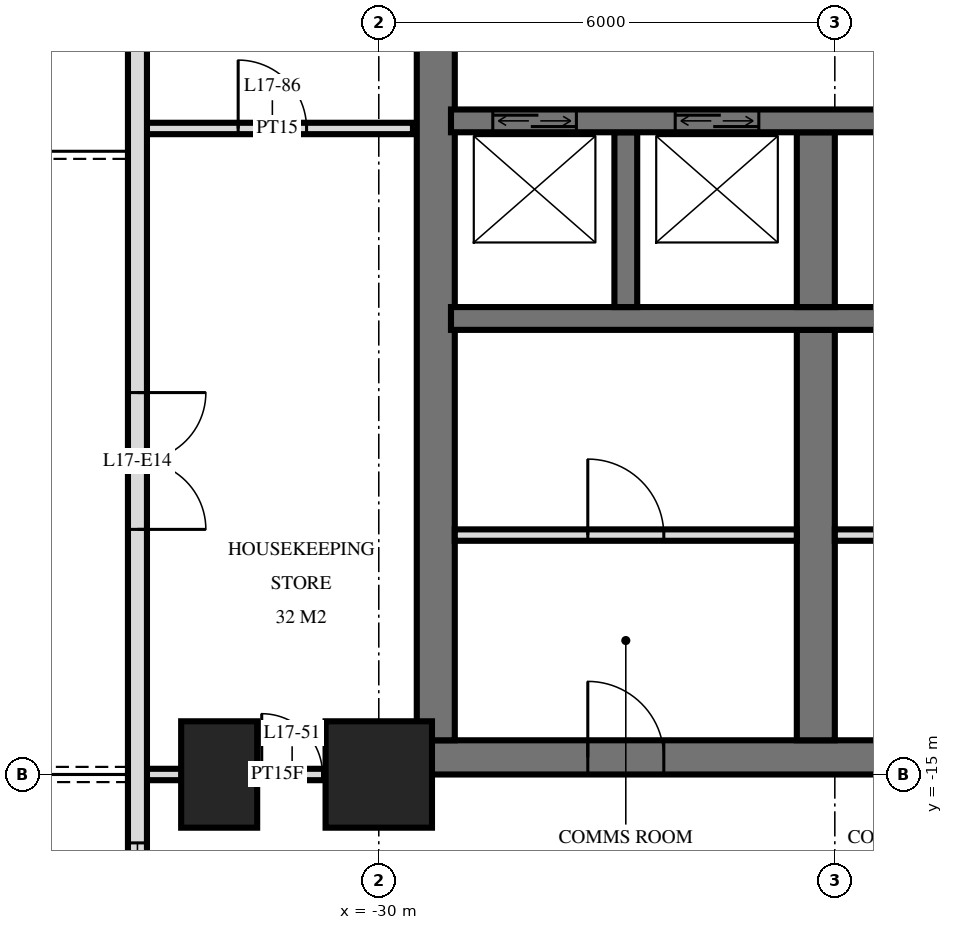
"""IFC4 building model, lengths in metres.
Left out: names, types, materials, properties, quantities, classifications, styles, units other than length and angle.
Written with IfcOpenShell. Run it as: python <this file> out.ifc"""

import sys

from ifc_helpers import new_model, si_unit, direction, frame, frame_2d, origin, origin_2d, place, context, subcontext, project, spatial, rectangle, extrude, element, fill, save


model = new_model("IFC4")
c1 = context("Model", 3, precision=1e-05, world=origin(), true_north=direction((0.0, 1.0)))
c2 = subcontext(c1, "Body", "Model", "MODEL_VIEW")
j1 = project(units=[si_unit("LENGTHUNIT", "METRE"), si_unit("PLANEANGLEUNIT", "RADIAN")], contexts=[c1])
p1 = place(None, origin())
s1 = spatial("IfcSite", under=j1, at=p1, CompositionType="ELEMENT")
p2 = place(p1, origin())
s2 = spatial("IfcBuilding", under=s1, at=p2, CompositionType="ELEMENT")
p3 = place(p2, frame((0.0, 0.0, 70.8)))
s3 = spatial("IfcBuildingStorey", under=s2, at=p3, CompositionType="ELEMENT", Elevation=70.8)
p4 = place(p3, frame((-32.1, -15.0, 0.0), z_axis=(0.0, 0.0, 1.0), x_axis=(0.0, 1.0, 0.0)))
e1 = element("IfcColumn", 1, at=p4, inside=s3, PredefinedType="COLUMN", context=c2, shape_type="SweptSolid", body=[
    extrude(rectangle(XDim=1.4, YDim=1.0, at=origin_2d()), origin(), (0.0, 0.0, 1.0), 3.6),
])
p5 = place(p3, frame((-30.0, -15.0, 0.0), z_axis=(0.0, 0.0, 1.0), x_axis=(1.0, 0.0, 0.0)))
e2 = element("IfcColumn", 2, at=p5, inside=s3, PredefinedType="COLUMN", context=c2, shape_type="SweptSolid", body=[
    extrude(rectangle(XDim=1.4, YDim=1.4, at=origin_2d()), origin(), (0.0, 0.0, 1.0), 3.6),
])
p6 = place(p3, frame((-29.5, -14.775, 0.0), z_axis=(0.0, 0.0, 1.0), x_axis=(1.0, 0.0, 0.0)))
e3 = element("IfcWall", 3, at=p6, inside=s3, PredefinedType="SHEAR", context=c2, shape_type="SweptSolid", body=[
    extrude(rectangle(XDim=19.5, YDim=0.45, at=frame_2d((9.75, 0.0))), origin(), (0.0, 0.0, 1.0), 3.6),
])
p7 = place(p6, frame((11.2, 0.0, 0.0)))
e4 = element("IfcOpeningElement", 4, at=p7, cuts=e3, PredefinedType="OPENING", context=c2, shape_type="SweptSolid", body=[
    extrude(rectangle(XDim=1.2, YDim=2.1, at=frame_2d((0.6, 1.05))), frame((0.0, 0.235, 0.0), z_axis=(0.0, -1.0, 0.0), x_axis=(1.0, 0.0, 0.0)), (0.0, 0.0, 1.0), 0.47),
])
p8 = place(p6, frame((14.25, 0.0, 0.0)))
e5 = element("IfcOpeningElement", 5, at=p8, cuts=e3, PredefinedType="OPENING", context=c2, shape_type="SweptSolid", body=[
    extrude(rectangle(XDim=1.1, YDim=2.1, at=frame_2d((0.55, 1.05))), frame((0.0, 0.235, 0.0), z_axis=(0.0, -1.0, 0.0), x_axis=(1.0, 0.0, 0.0)), (0.0, 0.0, 1.0), 0.47),
])
p9 = place(p6, frame((8.5, 0.0, 0.0)))
e6 = element("IfcOpeningElement", 6, at=p9, cuts=e3, PredefinedType="OPENING", context=c2, shape_type="SweptSolid", body=[
    extrude(rectangle(XDim=0.9, YDim=2.1, at=frame_2d((0.45, 1.05))), frame((0.0, 0.235, 0.0), z_axis=(0.0, -1.0, 0.0), x_axis=(1.0, 0.0, 0.0)), (0.0, 0.0, 1.0), 0.47),
])
p10 = place(p6, frame((6.05, 0.0, 0.0)))
e7 = element("IfcOpeningElement", 7, at=p10, cuts=e3, PredefinedType="OPENING", context=c2, shape_type="SweptSolid", body=[
    extrude(rectangle(XDim=1.0, YDim=2.1, at=frame_2d((0.5, 1.05))), frame((0.0, 0.235, 0.0), z_axis=(0.0, -1.0, 0.0), x_axis=(1.0, 0.0, 0.0)), (0.0, 0.0, 1.0), 0.47),
])
p11 = place(p6, frame((2.25, 0.0, 0.0)))
e8 = element("IfcOpeningElement", 8, at=p11, cuts=e3, PredefinedType="OPENING", context=c2, shape_type="SweptSolid", body=[
    extrude(rectangle(XDim=1.0, YDim=2.1, at=frame_2d((0.5, 1.05))), frame((0.0, 0.235, 0.0), z_axis=(0.0, -1.0, 0.0), x_axis=(1.0, 0.0, 0.0)), (0.0, 0.0, 1.0), 0.47),
])
p12 = place(p3, frame((-29.25, -14.55, 0.0), z_axis=(0.0, 0.0, 1.0), x_axis=(0.0, 1.0, 0.0)))
e9 = element("IfcWall", 9, at=p12, inside=s3, PredefinedType="SHEAR", context=c2, shape_type="SweptSolid", body=[
    extrude(rectangle(XDim=14.1, YDim=0.5, at=frame_2d((7.05, 0.0))), origin(), (0.0, 0.0, 1.0), 3.6),
])
p13 = place(p3, frame((-29.05, -6.4, 0.0), z_axis=(0.0, 0.0, 1.0), x_axis=(1.0, 0.0, 0.0)))
e10 = element("IfcWall", 10, at=p13, inside=s3, PredefinedType="SHEAR", context=c2, shape_type="SweptSolid", body=[
    extrude(rectangle(XDim=18.7, YDim=0.3, at=frame_2d((9.35, 0.0))), origin(), (0.0, 0.0, 1.0), 3.6),
])
p14 = place(p13, frame((2.95, 0.0, 0.0)))
e11 = element("IfcOpeningElement", 11, at=p14, cuts=e10, PredefinedType="OPENING", context=c2, shape_type="SweptSolid", body=[
    extrude(rectangle(XDim=1.1, YDim=2.1, at=frame_2d((0.55, 1.05))), frame((0.0, 0.16, 0.0), z_axis=(0.0, -1.0, 0.0), x_axis=(1.0, 0.0, 0.0)), (0.0, 0.0, 1.0), 0.32),
])
p15 = place(p13, frame((0.55, 0.0, 0.0)))
e12 = element("IfcOpeningElement", 12, at=p15, cuts=e10, PredefinedType="OPENING", context=c2, shape_type="SweptSolid", body=[
    extrude(rectangle(XDim=1.1, YDim=2.1, at=frame_2d((0.55, 1.05))), frame((0.0, 0.16, 0.0), z_axis=(0.0, -1.0, 0.0), x_axis=(1.0, 0.0, 0.0)), (0.0, 0.0, 1.0), 0.32),
])
p16 = place(p13, frame((10.8, 0.0, 0.0)))
e13 = element("IfcOpeningElement", 13, at=p16, cuts=e10, PredefinedType="OPENING", context=c2, shape_type="SweptSolid", body=[
    extrude(rectangle(XDim=1.1, YDim=2.1, at=frame_2d((0.55, 1.05))), frame((0.0, 0.16, 0.0), z_axis=(0.0, -1.0, 0.0), x_axis=(1.0, 0.0, 0.0)), (0.0, 0.0, 1.0), 0.32),
])
p17 = place(p13, frame((5.6, 0.0, 0.0)))
e14 = element("IfcOpeningElement", 14, at=p17, cuts=e10, PredefinedType="OPENING", context=c2, shape_type="SweptSolid", body=[
    extrude(rectangle(XDim=1.0, YDim=2.1, at=frame_2d((0.5, 1.05))), frame((0.0, 0.16, 0.0), z_axis=(0.0, -1.0, 0.0), x_axis=(1.0, 0.0, 0.0)), (0.0, 0.0, 1.0), 0.32),
])
p18 = place(p3, frame((-29.05, -9.0, 0.0), z_axis=(0.0, 0.0, 1.0), x_axis=(1.0, 0.0, 0.0)))
e15 = element("IfcWall", 15, at=p18, inside=s3, PredefinedType="SHEAR", context=c2, shape_type="SweptSolid", body=[
    extrude(rectangle(XDim=18.7, YDim=0.3, at=frame_2d((9.35, 0.0))), origin(), (0.0, 0.0, 1.0), 3.6),
])
p19 = place(p18, frame((13.8, 0.0, 0.0)))
e16 = element("IfcOpeningElement", 16, at=p19, cuts=e15, PredefinedType="OPENING", context=c2, shape_type="SweptSolid", body=[
    extrude(rectangle(XDim=1.1, YDim=2.1, at=frame_2d((0.55, 1.05))), frame((0.0, 0.16, 0.0), z_axis=(0.0, -1.0, 0.0), x_axis=(1.0, 0.0, 0.0)), (0.0, 0.0, 1.0), 0.32),
])
p20 = place(p3, frame((-24.25, -8.85, 0.0), z_axis=(0.0, 0.0, 1.0), x_axis=(0.0, 1.0, 0.0)))
e17 = element("IfcWall", 17, at=p20, inside=s3, PredefinedType="SHEAR", context=c2, shape_type="SweptSolid", body=[
    extrude(rectangle(XDim=2.3, YDim=0.5, at=frame_2d((1.15, 0.0))), origin(), (0.0, 0.0, 1.0), 3.6),
])
p21 = place(p3, frame((-24.25, -14.55, 0.0), z_axis=(0.0, 0.0, 1.0), x_axis=(0.0, 1.0, 0.0)))
e18 = element("IfcWall", 18, at=p21, inside=s3, PredefinedType="SHEAR", context=c2, shape_type="SweptSolid", body=[
    extrude(rectangle(XDim=5.4, YDim=0.5, at=frame_2d((2.7, 0.0))), origin(), (0.0, 0.0, 1.0), 3.6),
])
p22 = place(p3, frame((-26.75, -8.85, 0.0), z_axis=(0.0, 0.0, 1.0), x_axis=(0.0, 1.0, 0.0)))
e19 = element("IfcWall", 19, at=p22, inside=s3, PredefinedType="SHEAR", context=c2, shape_type="SweptSolid", body=[
    extrude(rectangle(XDim=2.3, YDim=0.3, at=frame_2d((1.15, 0.0))), origin(), (0.0, 0.0, 1.0), 3.6),
])
p23 = place(p3, frame((-33.175, -3.325, 0.0), z_axis=(0.0, 0.0, 1.0), x_axis=(0.0, -1.0, 0.0)))
e20 = element("IfcWall", 20, at=p23, inside=s3, PredefinedType="SOLIDWALL", context=c2, shape_type="SweptSolid", body=[
    extrude(rectangle(XDim=21.551, YDim=0.25, at=frame_2d((10.775, 0.0))), origin(), (0.0, 0.0, 1.0), 3.32),
])
p24 = place(p23, frame((6.65, 0.0, 0.0)))
e21 = element("IfcOpeningElement", 21, at=p24, cuts=e20, PredefinedType="OPENING", context=c2, shape_type="SweptSolid", body=[
    extrude(rectangle(XDim=1.8, YDim=2.4, at=frame_2d((0.9, 1.2))), frame((0.0, 0.135, 0.0), z_axis=(0.0, -1.0, 0.0), x_axis=(1.0, 0.0, 0.0)), (0.0, 0.0, 1.0), 0.27),
])
p25 = place(p23, frame((12.575, 0.0, 0.3)))
e22 = element("IfcOpeningElement", 22, at=p25, cuts=e20, PredefinedType="OPENING", context=c2, shape_type="SweptSolid", body=[
    extrude(rectangle(XDim=1.2, YDim=2.1, at=frame_2d((0.6, 1.05))), frame((0.0, 0.135, 0.0), z_axis=(0.0, -1.0, 0.0), x_axis=(1.0, 0.0, 0.0)), (0.0, 0.0, 1.0), 0.27),
])
p26 = place(p23, frame((15.275, 0.0, 0.0)))
e23 = element("IfcOpeningElement", 23, at=p26, cuts=e20, PredefinedType="OPENING", context=c2, shape_type="SweptSolid", body=[
    extrude(rectangle(XDim=1.8, YDim=2.4, at=frame_2d((0.9, 1.2))), frame((0.0, 0.135, 0.0), z_axis=(0.0, -1.0, 0.0), x_axis=(1.0, 0.0, 0.0)), (0.0, 0.0, 1.0), 0.27),
])
p27 = place(p23, frame((18.875, 0.0, 0.0)))
e24 = element("IfcOpeningElement", 24, at=p27, cuts=e20, PredefinedType="OPENING", context=c2, shape_type="SweptSolid", body=[
    extrude(rectangle(XDim=1.8, YDim=2.4, at=frame_2d((0.9, 1.2))), frame((0.0, 0.135, 0.0), z_axis=(0.0, -1.0, 0.0), x_axis=(1.0, 0.0, 0.0)), (0.0, 0.0, 1.0), 0.27),
])
p28 = place(p3, frame((-24.0, -11.85, 0.0), z_axis=(0.0, 0.0, 1.0), x_axis=(1.0, 0.0, 0.0)))
e25 = element("IfcWall", 25, at=p28, inside=s3, PredefinedType="PARTITIONING", context=c2, shape_type="SweptSolid", body=[
    extrude(rectangle(XDim=2.1, YDim=0.15, at=frame_2d((1.05, 0.0))), origin(), (0.0, 0.0, 1.0), 3.3),
])
p29 = place(p28, frame((0.55, 0.0, 0.0)))
e26 = element("IfcOpeningElement", 26, at=p29, cuts=e25, PredefinedType="OPENING", context=c2, shape_type="SweptSolid", body=[
    extrude(rectangle(XDim=1.0, YDim=2.1, at=frame_2d((0.5, 1.05))), frame((0.0, 0.085, 0.0), z_axis=(0.0, -1.0, 0.0), x_axis=(1.0, 0.0, 0.0)), (0.0, 0.0, 1.0), 0.17),
])
p30 = place(p3, frame((-29.0, -11.85, 0.0), z_axis=(0.0, 0.0, 1.0), x_axis=(1.0, 0.0, 0.0)))
e27 = element("IfcWall", 27, at=p30, inside=s3, PredefinedType="PARTITIONING", context=c2, shape_type="SweptSolid", body=[
    extrude(rectangle(XDim=4.5, YDim=0.15, at=frame_2d((2.25, 0.0))), origin(), (0.0, 0.0, 1.0), 3.3),
])
p31 = place(p30, frame((1.75, 0.0, 0.0)))
e28 = element("IfcOpeningElement", 28, at=p31, cuts=e27, PredefinedType="OPENING", context=c2, shape_type="SweptSolid", body=[
    extrude(rectangle(XDim=1.0, YDim=2.1, at=frame_2d((0.5, 1.05))), frame((0.0, 0.085, 0.0), z_axis=(0.0, -1.0, 0.0), x_axis=(1.0, 0.0, 0.0)), (0.0, 0.0, 1.0), 0.17),
])
p32 = place(p3, frame((-33.12, -15.0, 0.0), z_axis=(0.0, 0.0, 1.0), x_axis=(1.0, 0.0, 0.0)))
e29 = element("IfcWall", 29, at=p32, inside=s3, PredefinedType="PARTITIONING", context=c2, shape_type="SweptSolid", body=[
    extrude(rectangle(XDim=3.57, YDim=0.15, at=frame_2d((1.785, 0.0))), origin(), (0.0, 0.0, 1.0), 3.32),
])
p33 = place(p32, frame((1.58, 0.0, 0.0)))
e30 = element("IfcOpeningElement", 30, at=p33, cuts=e29, PredefinedType="OPENING", context=c2, shape_type="SweptSolid", body=[
    extrude(rectangle(XDim=0.8, YDim=2.1, at=frame_2d((0.4, 1.05))), frame((0.0, 0.085, 0.0), z_axis=(0.0, -1.0, 0.0), x_axis=(1.0, 0.0, 0.0)), (0.0, 0.0, 1.0), 0.17),
])
p34 = place(p3, frame((-33.12, -6.5, 0.0), z_axis=(0.0, 0.0, 1.0), x_axis=(1.0, 0.0, 0.0)))
e31 = element("IfcWall", 31, at=p34, inside=s3, PredefinedType="PARTITIONING", context=c2, shape_type="SweptSolid", body=[
    extrude(rectangle(XDim=3.57, YDim=0.15, at=frame_2d((1.785, 0.0))), origin(), (0.0, 0.0, 1.0), 3.32),
])
p35 = place(p34, frame((1.27, 0.0, 0.0)))
e32 = element("IfcOpeningElement", 32, at=p35, cuts=e31, PredefinedType="OPENING", context=c2, shape_type="SweptSolid", body=[
    extrude(rectangle(XDim=0.9, YDim=2.1, at=frame_2d((0.45, 1.05))), frame((0.0, 0.085, 0.0), z_axis=(0.0, -1.0, 0.0), x_axis=(1.0, 0.0, 0.0)), (0.0, 0.0, 1.0), 0.17),
])
p36 = place(p24, origin())
e33 = element("IfcDoor", 33, at=p36, inside=s3, OperationType="DOUBLE_DOOR_SINGLE_SWING", PredefinedType="DOOR", context=c2, shape_type="SweptSolid", body=[
    extrude(rectangle(XDim=1.8, YDim=2.4, at=frame_2d((0.9, 1.2))), frame((0.0, 0.025, 0.0), z_axis=(0.0, -1.0, 0.0), x_axis=(1.0, 0.0, 0.0)), (0.0, 0.0, 1.0), 0.05),
])
fill(e21, e33)
p37 = place(p25, origin())
e34 = element("IfcWindow", 34, at=p37, inside=s3, PartitioningType="SINGLE_PANEL", PredefinedType="WINDOW", context=c2, shape_type="SweptSolid", body=[
    extrude(rectangle(XDim=1.2, YDim=2.1, at=frame_2d((0.6, 1.05))), frame((0.0, 0.03, 0.0), z_axis=(0.0, -1.0, 0.0), x_axis=(1.0, 0.0, 0.0)), (0.0, 0.0, 1.0), 0.06),
])
fill(e22, e34)
p38 = place(p14, origin())
e35 = element("IfcDoor", 35, at=p38, inside=s3, OperationType="DOUBLE_DOOR_SLIDING", PredefinedType="USERDEFINED", context=c2, shape_type="SweptSolid", body=[
    extrude(rectangle(XDim=1.1, YDim=2.1, at=frame_2d((0.55, 1.05))), frame((0.0, 0.025, 0.0), z_axis=(0.0, -1.0, 0.0), x_axis=(1.0, 0.0, 0.0)), (0.0, 0.0, 1.0), 0.05),
])
fill(e11, e35)
p39 = place(p15, origin())
e36 = element("IfcDoor", 36, at=p39, inside=s3, OperationType="DOUBLE_DOOR_SLIDING", PredefinedType="USERDEFINED", context=c2, shape_type="SweptSolid", body=[
    extrude(rectangle(XDim=1.1, YDim=2.1, at=frame_2d((0.55, 1.05))), frame((0.0, 0.025, 0.0), z_axis=(0.0, -1.0, 0.0), x_axis=(1.0, 0.0, 0.0)), (0.0, 0.0, 1.0), 0.05),
])
fill(e12, e36)
p40 = place(p11, origin())
e37 = element("IfcDoor", 37, at=p40, inside=s3, OperationType="SINGLE_SWING_RIGHT", PredefinedType="DOOR", context=c2, shape_type="SweptSolid", body=[
    extrude(rectangle(XDim=1.0, YDim=2.1, at=frame_2d((0.5, 1.05))), frame((0.0, 0.025, 0.0), z_axis=(0.0, -1.0, 0.0), x_axis=(1.0, 0.0, 0.0)), (0.0, 0.0, 1.0), 0.05),
])
fill(e8, e37)
p41 = place(p31, origin())
e38 = element("IfcDoor", 38, at=p41, inside=s3, OperationType="SINGLE_SWING_RIGHT", PredefinedType="DOOR", context=c2, shape_type="SweptSolid", body=[
    extrude(rectangle(XDim=1.0, YDim=2.1, at=frame_2d((0.5, 1.05))), frame((0.0, 0.025, 0.0), z_axis=(0.0, -1.0, 0.0), x_axis=(1.0, 0.0, 0.0)), (0.0, 0.0, 1.0), 0.05),
])
fill(e28, e38)
p42 = place(p33, origin())
e39 = element("IfcDoor", 39, at=p42, inside=s3, OperationType="SINGLE_SWING_RIGHT", PredefinedType="DOOR", context=c2, shape_type="SweptSolid", body=[
    extrude(rectangle(XDim=0.8, YDim=2.1, at=frame_2d((0.4, 1.05))), frame((0.0, 0.025, 0.0), z_axis=(0.0, -1.0, 0.0), x_axis=(1.0, 0.0, 0.0)), (0.0, 0.0, 1.0), 0.05),
])
fill(e30, e39)
p43 = place(p35, origin())
e40 = element("IfcDoor", 40, at=p43, inside=s3, OperationType="SINGLE_SWING_RIGHT", PredefinedType="DOOR", context=c2, shape_type="SweptSolid", body=[
    extrude(rectangle(XDim=0.9, YDim=2.1, at=frame_2d((0.45, 1.05))), frame((0.0, 0.025, 0.0), z_axis=(0.0, -1.0, 0.0), x_axis=(1.0, 0.0, 0.0)), (0.0, 0.0, 1.0), 0.05),
])
fill(e32, e40)
save(model, sys.argv[1])
